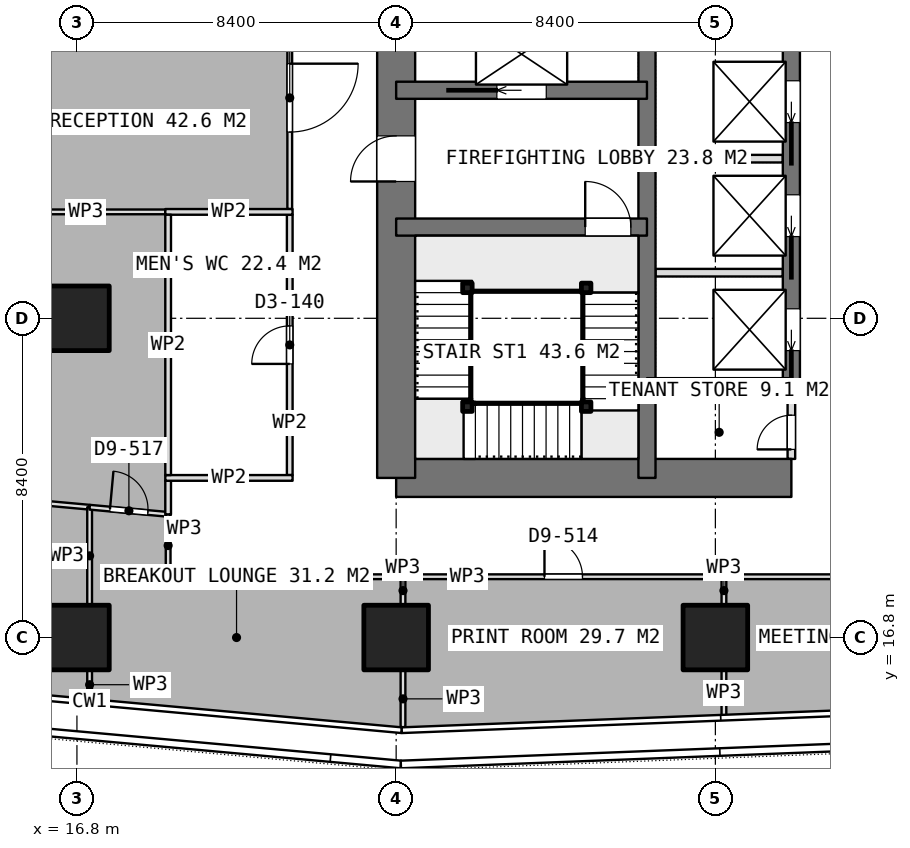
"""IFC4 building model, lengths in metres.
Left out: names, types, materials, properties, quantities, classifications, styles, units other than length and angle.
Written with IfcOpenShell. Run it as: python <this file> out.ifc"""

import sys

from ifc_helpers import new_model, si_unit, direction, frame, frame_2d, origin, origin_2d, place, context, subcontext, project, spatial, rectangle, extrude, element, fill, save


model = new_model("IFC4")
c1 = context("Model", 3, precision=1e-05, world=origin(), true_north=direction((0.0, 1.0)))
c2 = subcontext(c1, "Body", "Model", "MODEL_VIEW")
j1 = project(units=[si_unit("LENGTHUNIT", "METRE"), si_unit("PLANEANGLEUNIT", "RADIAN")], contexts=[c1])
p1 = place(None, origin())
s1 = spatial("IfcSite", under=j1, at=p1, CompositionType="ELEMENT")
p2 = place(p1, origin())
s2 = spatial("IfcBuilding", under=s1, at=p2, CompositionType="ELEMENT")
p3 = place(p2, frame((0.0, 0.0, 132.8)))
s3 = spatial("IfcBuildingStorey", under=s2, at=p3, CompositionType="ELEMENT", Elevation=132.8)
p4 = place(p3, frame((25.2, 21.0, 0.0), z_axis=(0.0, 0.0, 1.0), x_axis=(1.0, 0.0, 0.0)))
e1 = element("IfcWall", 1, at=p4, inside=s3, PredefinedType="SHEAR", context=c2, shape_type="SweptSolid", body=[
    extrude(rectangle(XDim=10.4, YDim=1.0, at=frame_2d((5.2, 0.0))), origin(), (0.0, 0.0, 1.0), 3.75),
])
p5 = place(p3, frame((25.2, 21.0, 0.0), z_axis=(0.0, 0.0, 1.0), x_axis=(0.0, 1.0, 0.0)))
e2 = element("IfcWall", 2, at=p5, inside=s3, PredefinedType="SHEAR", context=c2, shape_type="SweptSolid", body=[
    extrude(rectangle(XDim=25.2, YDim=1.0, at=frame_2d((12.6, 0.0))), origin(), (0.0, 0.0, 1.0), 3.75),
])
p6 = place(p5, frame((7.8, 0.0, 0.0)))
e3 = element("IfcOpeningElement", 3, at=p6, cuts=e2, PredefinedType="OPENING", context=c2, shape_type="SweptSolid", body=[
    extrude(rectangle(XDim=1.2, YDim=2.1, at=frame_2d((0.6, 1.05))), frame((0.0, 0.51, 0.0), z_axis=(0.0, -1.0, 0.0), x_axis=(1.0, 0.0, 0.0)), (0.0, 0.0, 1.0), 1.02),
])
p7 = place(p5, frame((14.25, 0.0, 0.0)))
e4 = element("IfcOpeningElement", 4, at=p7, cuts=e2, PredefinedType="OPENING", context=c2, shape_type="SweptSolid", body=[
    extrude(rectangle(XDim=0.9, YDim=2.1, at=frame_2d((0.45, 1.05))), frame((0.0, 0.51, 0.0), z_axis=(0.0, -1.0, 0.0), x_axis=(1.0, 0.0, 0.0)), (0.0, 0.0, 1.0), 1.02),
])
p8 = place(p5, frame((16.85, 0.0, 0.0)))
e5 = element("IfcOpeningElement", 5, at=p8, cuts=e2, PredefinedType="OPENING", context=c2, shape_type="SweptSolid", body=[
    extrude(rectangle(XDim=0.9, YDim=2.1, at=frame_2d((0.45, 1.05))), frame((0.0, 0.51, 0.0), z_axis=(0.0, -1.0, 0.0), x_axis=(1.0, 0.0, 0.0)), (0.0, 0.0, 1.0), 1.02),
])
p9 = place(p5, frame((19.025, 0.0, 0.0)))
e6 = element("IfcOpeningElement", 6, at=p9, cuts=e2, PredefinedType="OPENING", context=c2, shape_type="SweptSolid", body=[
    extrude(rectangle(XDim=1.2, YDim=2.1, at=frame_2d((0.6, 1.05))), frame((0.0, 0.51, 0.0), z_axis=(0.0, -1.0, 0.0), x_axis=(1.0, 0.0, 0.0)), (0.0, 0.0, 1.0), 1.02),
])
p10 = place(p3, frame((31.8, 21.0, 0.0), z_axis=(0.0, 0.0, 1.0), x_axis=(0.0, 1.0, 0.0)))
e7 = element("IfcWall", 7, at=p10, inside=s3, PredefinedType="SHEAR", context=c2, shape_type="SweptSolid", body=[
    extrude(rectangle(XDim=25.2, YDim=0.45, at=frame_2d((12.6, 0.0))), origin(), (0.0, 0.0, 1.0), 3.75),
])
p11 = place(p3, frame((35.6, 23.4, 0.0), z_axis=(0.0, 0.0, 1.0), x_axis=(0.0, 1.0, 0.0)))
e8 = element("IfcWall", 8, at=p11, inside=s3, PredefinedType="SHEAR", context=c2, shape_type="SweptSolid", body=[
    extrude(rectangle(XDim=18.0, YDim=0.45, at=frame_2d((9.0, 0.0))), origin(), (0.0, 0.0, 1.0), 3.75),
])
p12 = place(p11, frame((0.95, 0.0, 0.0)))
e9 = element("IfcOpeningElement", 9, at=p12, cuts=e8, PredefinedType="OPENING", context=c2, shape_type="SweptSolid", body=[
    extrude(rectangle(XDim=1.1, YDim=2.1, at=frame_2d((0.55, 1.05))), frame((0.0, 0.235, 0.0), z_axis=(0.0, -1.0, 0.0), x_axis=(1.0, 0.0, 0.0)), (0.0, 0.0, 1.0), 0.47),
])
p13 = place(p11, frame((3.95, 0.0, 0.0)))
e10 = element("IfcOpeningElement", 10, at=p13, cuts=e8, PredefinedType="OPENING", context=c2, shape_type="SweptSolid", body=[
    extrude(rectangle(XDim=1.1, YDim=2.1, at=frame_2d((0.55, 1.05))), frame((0.0, 0.235, 0.0), z_axis=(0.0, -1.0, 0.0), x_axis=(1.0, 0.0, 0.0)), (0.0, 0.0, 1.0), 0.47),
])
p14 = place(p11, frame((6.95, 0.0, 0.0)))
e11 = element("IfcOpeningElement", 11, at=p14, cuts=e8, PredefinedType="OPENING", context=c2, shape_type="SweptSolid", body=[
    extrude(rectangle(XDim=1.1, YDim=2.1, at=frame_2d((0.55, 1.05))), frame((0.0, 0.235, 0.0), z_axis=(0.0, -1.0, 0.0), x_axis=(1.0, 0.0, 0.0)), (0.0, 0.0, 1.0), 0.47),
])
p15 = place(p11, frame((9.95, 0.0, 0.0)))
e12 = element("IfcOpeningElement", 12, at=p15, cuts=e8, PredefinedType="OPENING", context=c2, shape_type="SweptSolid", body=[
    extrude(rectangle(XDim=1.1, YDim=2.1, at=frame_2d((0.55, 1.05))), frame((0.0, 0.235, 0.0), z_axis=(0.0, -1.0, 0.0), x_axis=(1.0, 0.0, 0.0)), (0.0, 0.0, 1.0), 0.47),
])
p16 = place(p11, frame((12.95, 0.0, 0.0)))
e13 = element("IfcOpeningElement", 13, at=p16, cuts=e8, PredefinedType="OPENING", context=c2, shape_type="SweptSolid", body=[
    extrude(rectangle(XDim=1.1, YDim=2.1, at=frame_2d((0.55, 1.05))), frame((0.0, 0.235, 0.0), z_axis=(0.0, -1.0, 0.0), x_axis=(1.0, 0.0, 0.0)), (0.0, 0.0, 1.0), 0.47),
])
p17 = place(p11, frame((15.95, 0.0, 0.0)))
e14 = element("IfcOpeningElement", 14, at=p17, cuts=e8, PredefinedType="OPENING", context=c2, shape_type="SweptSolid", body=[
    extrude(rectangle(XDim=1.1, YDim=2.1, at=frame_2d((0.55, 1.05))), frame((0.0, 0.235, 0.0), z_axis=(0.0, -1.0, 0.0), x_axis=(1.0, 0.0, 0.0)), (0.0, 0.0, 1.0), 0.47),
])
p18 = place(p3, frame((31.8, 23.4, 0.0), z_axis=(0.0, 0.0, 1.0), x_axis=(1.0, 0.0, 0.0)))
e15 = element("IfcWall", 15, at=p18, inside=s3, PredefinedType="SHEAR", context=c2, shape_type="SweptSolid", body=[
    extrude(rectangle(XDim=3.8, YDim=0.45, at=frame_2d((1.9, 0.0))), origin(), (0.0, 0.0, 1.0), 3.75),
])
p19 = place(p3, frame((25.2, 27.6, 0.0), z_axis=(0.0, 0.0, 1.0), x_axis=(1.0, 0.0, 0.0)))
e16 = element("IfcWall", 16, at=p19, inside=s3, PredefinedType="SHEAR", context=c2, shape_type="SweptSolid", body=[
    extrude(rectangle(XDim=6.6, YDim=0.45, at=frame_2d((3.3, 0.0))), origin(), (0.0, 0.0, 1.0), 3.75),
])
p20 = place(p19, frame((4.975, 0.0, 0.0)))
e17 = element("IfcOpeningElement", 17, at=p20, cuts=e16, PredefinedType="OPENING", context=c2, shape_type="SweptSolid", body=[
    extrude(rectangle(XDim=1.2, YDim=2.1, at=frame_2d((0.6, 1.05))), frame((0.0, 0.235, 0.0), z_axis=(0.0, -1.0, 0.0), x_axis=(1.0, 0.0, 0.0)), (0.0, 0.0, 1.0), 0.47),
])
p21 = place(p3, frame((25.2, 31.2, 0.0), z_axis=(0.0, 0.0, 1.0), x_axis=(1.0, 0.0, 0.0)))
e18 = element("IfcWall", 18, at=p21, inside=s3, PredefinedType="SHEAR", context=c2, shape_type="SweptSolid", body=[
    extrude(rectangle(XDim=6.6, YDim=0.45, at=frame_2d((3.3, 0.0))), origin(), (0.0, 0.0, 1.0), 3.75),
])
p22 = place(p21, frame((2.65, 0.0, 0.0)))
e19 = element("IfcOpeningElement", 19, at=p22, cuts=e18, PredefinedType="OPENING", context=c2, shape_type="SweptSolid", body=[
    extrude(rectangle(XDim=1.3, YDim=2.1, at=frame_2d((0.65, 1.05))), frame((0.0, 0.235, 0.0), z_axis=(0.0, -1.0, 0.0), x_axis=(1.0, 0.0, 0.0)), (0.0, 0.0, 1.0), 0.47),
])
for number, where, z_axis, x_axis in (
    (20, (16.8, 16.8, 0.0), (0.0, 0.0, 1.0), (1.0, 0.0, 0.0)),
    (21, (16.8, 25.2, 0.0), (0.0, 0.0, 1.0), (1.0, 0.0, 0.0)),
    (22, (25.2, 16.8, 0.0), (0.0, 0.0, 1.0), (1.0, 0.0, 0.0)),
    (23, (33.6, 16.8, 0.0), (0.0, 0.0, 1.0), (1.0, 0.0, 0.0)),
):
    element("IfcColumn", number, at=place(p3, frame(where, z_axis=z_axis, x_axis=x_axis)), inside=s3, PredefinedType="COLUMN", context=c2, shape_type="SweptSolid", body=[
        extrude(rectangle(XDim=1.7, YDim=1.7, at=origin_2d()), origin(), (0.0, 0.0, 1.0), 3.75),
    ])
for number, where, z_axis, x_axis in (
    (24, (32.025, 26.4, 0.0), (0.0, 0.0, 1.0), (1.0, 0.0, 0.0)),
    (25, (32.025, 29.4, 0.0), (0.0, 0.0, 1.0), (1.0, 0.0, 0.0)),
):
    element("IfcWall", number, at=place(p3, frame(where, z_axis=z_axis, x_axis=x_axis)), inside=s3, PredefinedType="PARTITIONING", context=c2, shape_type="SweptSolid", body=[
        extrude(rectangle(XDim=3.35, YDim=0.2, at=frame_2d((1.675, 0.0))), origin(), (0.0, 0.0, 1.0), 3.5),
    ])
p23 = place(p3, frame((35.6, 21.5, 0.0), z_axis=(0.0, 0.0, 1.0), x_axis=(0.0, 1.0, 0.0)))
e26 = element("IfcWall", 26, at=p23, inside=s3, PredefinedType="PARTITIONING", context=c2, shape_type="SweptSolid", body=[
    extrude(rectangle(XDim=1.675, YDim=0.2, at=frame_2d((0.837, 0.0))), origin(), (0.0, 0.0, 1.0), 3.5),
])
p24 = place(p23, frame((0.25, 0.0, 0.0)))
e27 = element("IfcOpeningElement", 27, at=p24, cuts=e26, PredefinedType="OPENING", context=c2, shape_type="SweptSolid", body=[
    extrude(rectangle(XDim=0.9, YDim=2.1, at=frame_2d((0.45, 1.05))), frame((0.0, 0.11, 0.0), z_axis=(0.0, -1.0, 0.0), x_axis=(1.0, 0.0, 0.0)), (0.0, 0.0, 1.0), 0.22),
])
for number, where, z_axis, x_axis in (
    (28, (19.125, 21.0, 0.0), (0.0, 0.0, 1.0), (1.0, 0.0, 0.0)),
    (29, (19.125, 28.0, 0.0), (0.0, 0.0, 1.0), (1.0, 0.0, 0.0)),
):
    element("IfcWall", number, at=place(p3, frame(where, z_axis=z_axis, x_axis=x_axis)), inside=s3, PredefinedType="PARTITIONING", context=c2, shape_type="SweptSolid", body=[
        extrude(rectangle(XDim=3.35, YDim=0.15, at=frame_2d((1.675, 0.0))), origin(), (0.0, 0.0, 1.0), 3.5),
    ])
p25 = place(p3, frame((19.2, 21.075, 0.0), z_axis=(0.0, 0.0, 1.0), x_axis=(0.0, 1.0, 0.0)))
e30 = element("IfcWall", 30, at=p25, inside=s3, PredefinedType="PARTITIONING", context=c2, shape_type="SweptSolid", body=[
    extrude(rectangle(XDim=6.85, YDim=0.15, at=frame_2d((3.425, 0.0))), origin(), (0.0, 0.0, 1.0), 3.5),
])
p26 = place(p3, frame((22.4, 21.075, 0.0), z_axis=(0.0, 0.0, 1.0), x_axis=(0.0, 1.0, 0.0)))
e31 = element("IfcWall", 31, at=p26, inside=s3, PredefinedType="PARTITIONING", context=c2, shape_type="SweptSolid", body=[
    extrude(rectangle(XDim=6.85, YDim=0.15, at=frame_2d((3.425, 0.0))), origin(), (0.0, 0.0, 1.0), 3.5),
])
p27 = place(p26, frame((2.925, 0.0, 0.0)))
e32 = element("IfcOpeningElement", 32, at=p27, cuts=e31, PredefinedType="OPENING", context=c2, shape_type="SweptSolid", body=[
    extrude(rectangle(XDim=1.0, YDim=2.1, at=frame_2d((0.5, 1.05))), frame((0.0, 0.085, 0.0), z_axis=(0.0, -1.0, 0.0), x_axis=(1.0, 0.0, 0.0)), (0.0, 0.0, 1.0), 0.17),
])
p28 = place(p3, frame((25.38, 18.4, 0.0), z_axis=(0.0, 0.0, 1.0), x_axis=(1.0, 0.0, 0.0)))
e33 = element("IfcWall", 33, at=p28, inside=s3, PredefinedType="PARTITIONING", context=c2, shape_type="SweptSolid", body=[
    extrude(rectangle(XDim=8.445, YDim=0.125, at=frame_2d((4.223, 0.0))), origin(), (0.0, 0.0, 1.0), 3.5),
])
p29 = place(p28, frame((3.723, 0.0, 0.0)))
e34 = element("IfcOpeningElement", 34, at=p29, cuts=e33, PredefinedType="OPENING", context=c2, shape_type="SweptSolid", body=[
    extrude(rectangle(XDim=1.0, YDim=2.1, at=frame_2d((0.5, 1.05))), frame((0.0, 0.073, 0.0), z_axis=(0.0, -1.0, 0.0), x_axis=(1.0, 0.0, 0.0)), (0.0, 0.0, 1.0), 0.145),
])
p30 = place(p3, frame((33.825, 18.4, 0.0), z_axis=(0.0, 0.0, 1.0), x_axis=(0.0, -1.0, 0.0)))
e35 = element("IfcWall", 35, at=p30, inside=s3, PredefinedType="PARTITIONING", context=c2, shape_type="SweptSolid", body=[
    extrude(rectangle(XDim=0.73, YDim=0.125, at=frame_2d((0.365, 0.0))), origin(), (0.0, 0.0, 1.0), 3.5),
])
p31 = place(p3, frame((33.825, 15.93, 0.0), z_axis=(0.0, 0.0, 1.0), x_axis=(0.0, -1.0, 0.0)))
e36 = element("IfcWall", 36, at=p31, inside=s3, PredefinedType="PARTITIONING", context=c2, shape_type="SweptSolid", body=[
    extrude(rectangle(XDim=1.188, YDim=0.125, at=frame_2d((0.594, 0.0))), origin(), (0.0, 0.0, 1.0), 3.5),
])
p32 = place(p3, frame((25.38, 14.443, 0.0), z_axis=(0.0, 0.0, 1.0), x_axis=(0.0, 1.0, 0.0)))
e37 = element("IfcWall", 37, at=p32, inside=s3, PredefinedType="PARTITIONING", context=c2, shape_type="SweptSolid", body=[
    extrude(rectangle(XDim=1.487, YDim=0.125, at=frame_2d((0.743, 0.0))), origin(), (0.0, 0.0, 1.0), 3.5),
])
p33 = place(p3, frame((25.38, 17.67, 0.0), z_axis=(0.0, 0.0, 1.0), x_axis=(0.0, 1.0, 0.0)))
e38 = element("IfcWall", 38, at=p33, inside=s3, PredefinedType="PARTITIONING", context=c2, shape_type="SweptSolid", body=[
    extrude(rectangle(XDim=0.73, YDim=0.125, at=frame_2d((0.365, 0.0))), origin(), (0.0, 0.0, 1.0), 3.5),
])
p34 = place(p3, frame((33.826, 18.4, 0.0), z_axis=(0.0, 0.0, 1.0), x_axis=(1.0, 0.0, 0.0)))
e39 = element("IfcWall", 39, at=p34, inside=s3, PredefinedType="PARTITIONING", context=c2, shape_type="SweptSolid", body=[
    extrude(rectangle(XDim=7.914, YDim=0.125, at=frame_2d((3.957, 0.0))), origin(), (0.0, 0.0, 1.0), 3.5),
])
p35 = place(p34, frame((3.457, 0.0, 0.0)))
e40 = element("IfcOpeningElement", 40, at=p35, cuts=e39, PredefinedType="OPENING", context=c2, shape_type="SweptSolid", body=[
    extrude(rectangle(XDim=1.0, YDim=2.1, at=frame_2d((0.5, 1.05))), frame((0.0, 0.073, 0.0), z_axis=(0.0, -1.0, 0.0), x_axis=(1.0, 0.0, 0.0)), (0.0, 0.0, 1.0), 0.145),
])
p36 = place(p3, frame((12.018, 20.694, 0.0), z_axis=(0.0, 0.0, 1.0), x_axis=(0.995893206468, -0.090535746043, 0.0)))
e41 = element("IfcWall", 41, at=p36, inside=s3, PredefinedType="PARTITIONING", context=c2, shape_type="SweptSolid", body=[
    extrude(rectangle(XDim=5.137, YDim=0.125, at=frame_2d((2.568, 0.0))), origin(), (0.0, 0.0, 1.0), 3.5),
])
p37 = place(p3, frame((17.134, 20.229, 0.0), z_axis=(0.0, 0.0, 1.0), x_axis=(0.0, -1.0, 0.0)))
e42 = element("IfcWall", 42, at=p37, inside=s3, PredefinedType="PARTITIONING", context=c2, shape_type="SweptSolid", body=[
    extrude(rectangle(XDim=2.559, YDim=0.125, at=frame_2d((1.28, 0.0))), origin(), (0.0, 0.0, 1.0), 3.5),
])
p38 = place(p3, frame((17.134, 15.93, 0.0), z_axis=(0.0, 0.0, 1.0), x_axis=(0.0, -1.0, 0.0)))
e43 = element("IfcWall", 43, at=p38, inside=s3, PredefinedType="PARTITIONING", context=c2, shape_type="SweptSolid", body=[
    extrude(rectangle(XDim=0.742, YDim=0.125, at=frame_2d((0.371, 0.0))), origin(), (0.0, 0.0, 1.0), 3.5),
])
p39 = place(p3, frame((19.2, 18.4, 0.0), z_axis=(0.0, 0.0, 1.0), x_axis=(1.0, 0.0, 0.0)))
e44 = element("IfcWall", 44, at=p39, inside=s3, PredefinedType="PARTITIONING", context=c2, shape_type="SweptSolid", body=[
    extrude(rectangle(XDim=6.179, YDim=0.125, at=frame_2d((3.089, 0.0))), origin(), (0.0, 0.0, 1.0), 3.5),
])
p40 = place(p3, frame((17.135, 20.229, 0.0), z_axis=(0.0, 0.0, 1.0), x_axis=(0.995881616909, -0.090663140816, 0.0)))
e45 = element("IfcWall", 45, at=p40, inside=s3, PredefinedType="PARTITIONING", context=c2, shape_type="SweptSolid", body=[
    extrude(rectangle(XDim=2.073, YDim=0.125, at=frame_2d((1.037, 0.0))), origin(), (0.0, 0.0, 1.0), 3.5),
])
p41 = place(p40, frame((0.537, 0.0, 0.0)))
e46 = element("IfcOpeningElement", 46, at=p41, cuts=e45, PredefinedType="OPENING", context=c2, shape_type="SweptSolid", body=[
    extrude(rectangle(XDim=1.0, YDim=2.1, at=frame_2d((0.5, 1.05))), frame((0.0, 0.073, 0.0), z_axis=(0.0, -1.0, 0.0), x_axis=(1.0, 0.0, 0.0)), (0.0, 0.0, 1.0), 0.145),
])
p42 = place(p3, frame((19.2, 20.041, 0.0), z_axis=(0.0, 0.0, 1.0), x_axis=(0.0, -1.0, 0.0)))
e47 = element("IfcWall", 47, at=p42, inside=s3, PredefinedType="PARTITIONING", context=c2, shape_type="SweptSolid", body=[
    extrude(rectangle(XDim=1.641, YDim=0.125, at=frame_2d((0.821, 0.0))), origin(), (0.0, 0.0, 1.0), 3.5),
])
p43 = place(p3, frame((22.4, 34.0, 0.0), z_axis=(0.0, 0.0, 1.0), x_axis=(0.0, -1.0, 0.0)))
e48 = element("IfcWall", 48, at=p43, inside=s3, PredefinedType="PARTITIONING", context=c2, shape_type="SweptSolid", body=[
    extrude(rectangle(XDim=5.925, YDim=0.125, at=frame_2d((2.962, 0.0))), origin(), (0.0, 0.0, 1.0), 3.5),
])
p44 = place(p43, frame((2.1, 0.0, 0.0)))
e49 = element("IfcOpeningElement", 49, at=p44, cuts=e48, PredefinedType="OPENING", context=c2, shape_type="SweptSolid", body=[
    extrude(rectangle(XDim=1.8, YDim=2.1, at=frame_2d((0.9, 1.05))), frame((0.0, 0.073, 0.0), z_axis=(0.0, -1.0, 0.0), x_axis=(1.0, 0.0, 0.0)), (0.0, 0.0, 1.0), 0.145),
])
p45 = place(p3, frame((19.125, 28.0, 0.0), z_axis=(0.0, 0.0, 1.0), x_axis=(-1.0, 0.0, 0.0)))
e50 = element("IfcWall", 50, at=p45, inside=s3, PredefinedType="PARTITIONING", context=c2, shape_type="SweptSolid", body=[
    extrude(rectangle(XDim=4.175, YDim=0.125, at=frame_2d((2.087, 0.0))), origin(), (0.0, 0.0, 1.0), 3.5),
])
p46 = place(p3, frame((19.2, 20.925, 0.0), z_axis=(0.0, 0.0, 1.0), x_axis=(0.0, -1.0, 0.0)))
e51 = element("IfcWall", 51, at=p46, inside=s3, PredefinedType="PARTITIONING", context=c2, shape_type="SweptSolid", body=[
    extrude(rectangle(XDim=0.884, YDim=0.15, at=frame_2d((0.442, 0.0))), origin(), (0.0, 0.0, 1.0), 3.5),
])
for number, where, z_axis, x_axis in (
    (52, (30.2, 26.0, 0.0), (0.0, 0.0, 1.0), (1.0, 0.0, 0.0)),
    (53, (30.2, 22.875, 0.0), (0.0, 0.0, 1.0), (1.0, 0.0, 0.0)),
    (54, (27.075, 22.875, 0.0), (0.0, 0.0, 1.0), (1.0, 0.0, 0.0)),
    (55, (27.075, 26.0, 0.0), (0.0, 0.0, 1.0), (1.0, 0.0, 0.0)),
):
    element("IfcColumn", number, at=place(p3, frame(where, z_axis=z_axis, x_axis=x_axis)), inside=s3, PredefinedType="COLUMN", context=c2, shape_type="SweptSolid", body=[
        extrude(rectangle(XDim=0.25, YDim=0.25, at=origin_2d()), origin(), (0.0, 0.0, 1.0), 3.75),
    ])
p47 = place(p6, origin())
e56 = element("IfcDoor", 56, at=p47, inside=s3, OperationType="SINGLE_SWING_LEFT", PredefinedType="DOOR", context=c2, shape_type="SweptSolid", body=[
    extrude(rectangle(XDim=1.2, YDim=2.1, at=frame_2d((0.6, 1.05))), frame((0.0, 0.025, 0.0), z_axis=(0.0, -1.0, 0.0), x_axis=(1.0, 0.0, 0.0)), (0.0, 0.0, 1.0), 0.05),
])
fill(e3, e56)
p48 = place(p24, origin())
e57 = element("IfcDoor", 57, at=p48, inside=s3, OperationType="SINGLE_SWING_LEFT", PredefinedType="DOOR", context=c2, shape_type="SweptSolid", body=[
    extrude(rectangle(XDim=0.9, YDim=2.1, at=frame_2d((0.45, 1.05))), frame((0.0, 0.025, 0.0), z_axis=(0.0, -1.0, 0.0), x_axis=(1.0, 0.0, 0.0)), (0.0, 0.0, 1.0), 0.05),
])
fill(e27, e57)
p49 = place(p12, origin())
e58 = element("IfcDoor", 58, at=p49, inside=s3, OperationType="SLIDING_TO_LEFT", PredefinedType="USERDEFINED", context=c2, shape_type="SweptSolid", body=[
    extrude(rectangle(XDim=1.1, YDim=2.1, at=frame_2d((0.55, 1.05))), frame((0.0, 0.025, 0.0), z_axis=(0.0, -1.0, 0.0), x_axis=(1.0, 0.0, 0.0)), (0.0, 0.0, 1.0), 0.05),
])
fill(e9, e58)
p50 = place(p13, origin())
e59 = element("IfcDoor", 59, at=p50, inside=s3, OperationType="SLIDING_TO_LEFT", PredefinedType="USERDEFINED", context=c2, shape_type="SweptSolid", body=[
    extrude(rectangle(XDim=1.1, YDim=2.1, at=frame_2d((0.55, 1.05))), frame((0.0, 0.025, 0.0), z_axis=(0.0, -1.0, 0.0), x_axis=(1.0, 0.0, 0.0)), (0.0, 0.0, 1.0), 0.05),
])
fill(e10, e59)
p51 = place(p14, origin())
e60 = element("IfcDoor", 60, at=p51, inside=s3, OperationType="SLIDING_TO_LEFT", PredefinedType="USERDEFINED", context=c2, shape_type="SweptSolid", body=[
    extrude(rectangle(XDim=1.1, YDim=2.1, at=frame_2d((0.55, 1.05))), frame((0.0, 0.025, 0.0), z_axis=(0.0, -1.0, 0.0), x_axis=(1.0, 0.0, 0.0)), (0.0, 0.0, 1.0), 0.05),
])
fill(e11, e60)
p52 = place(p22, origin())
e61 = element("IfcDoor", 61, at=p52, inside=s3, OperationType="SLIDING_TO_LEFT", PredefinedType="USERDEFINED", context=c2, shape_type="SweptSolid", body=[
    extrude(rectangle(XDim=1.3, YDim=2.1, at=frame_2d((0.65, 1.05))), frame((0.0, 0.025, 0.0), z_axis=(0.0, -1.0, 0.0), x_axis=(1.0, 0.0, 0.0)), (0.0, 0.0, 1.0), 0.05),
])
fill(e19, e61)
p53 = place(p27, origin())
e62 = element("IfcDoor", 62, at=p53, inside=s3, OperationType="SINGLE_SWING_LEFT", PredefinedType="DOOR", context=c2, shape_type="SweptSolid", body=[
    extrude(rectangle(XDim=1.0, YDim=2.1, at=frame_2d((0.5, 1.05))), frame((0.0, 0.025, 0.0), z_axis=(0.0, -1.0, 0.0), x_axis=(1.0, 0.0, 0.0)), (0.0, 0.0, 1.0), 0.05),
])
fill(e32, e62)
p54 = place(p29, origin())
e63 = element("IfcDoor", 63, at=p54, inside=s3, OperationType="SINGLE_SWING_LEFT", PredefinedType="DOOR", context=c2, shape_type="SweptSolid", body=[
    extrude(rectangle(XDim=1.0, YDim=2.1, at=frame_2d((0.5, 1.05))), frame((0.0, 0.025, 0.0), z_axis=(0.0, -1.0, 0.0), x_axis=(1.0, 0.0, 0.0)), (0.0, 0.0, 1.0), 0.05),
])
fill(e34, e63)
p55 = place(p41, origin())
e64 = element("IfcDoor", 64, at=p55, inside=s3, OperationType="SINGLE_SWING_LEFT", PredefinedType="DOOR", context=c2, shape_type="SweptSolid", body=[
    extrude(rectangle(XDim=1.0, YDim=2.1, at=frame_2d((0.5, 1.05))), frame((0.0, 0.025, 0.0), z_axis=(0.0, -1.0, 0.0), x_axis=(1.0, 0.0, 0.0)), (0.0, 0.0, 1.0), 0.05),
])
fill(e46, e64)
p56 = place(p44, origin())
e65 = element("IfcDoor", 65, at=p56, inside=s3, OperationType="DOUBLE_DOOR_SINGLE_SWING", PredefinedType="DOOR", context=c2, shape_type="SweptSolid", body=[
    extrude(rectangle(XDim=1.8, YDim=2.1, at=frame_2d((0.9, 1.05))), frame((0.0, 0.025, 0.0), z_axis=(0.0, -1.0, 0.0), x_axis=(1.0, 0.0, 0.0)), (0.0, 0.0, 1.0), 0.05),
])
fill(e49, e65)
p57 = place(p20, origin())
e66 = element("IfcDoor", 66, at=p57, inside=s3, OperationType="SINGLE_SWING_RIGHT", PredefinedType="DOOR", context=c2, shape_type="SweptSolid", body=[
    extrude(rectangle(XDim=1.2, YDim=2.1, at=frame_2d((0.6, 1.05))), frame((0.0, 0.025, 0.0), z_axis=(0.0, -1.0, 0.0), x_axis=(1.0, 0.0, 0.0)), (0.0, 0.0, 1.0), 0.05),
])
fill(e17, e66)
save(model, sys.argv[1])
